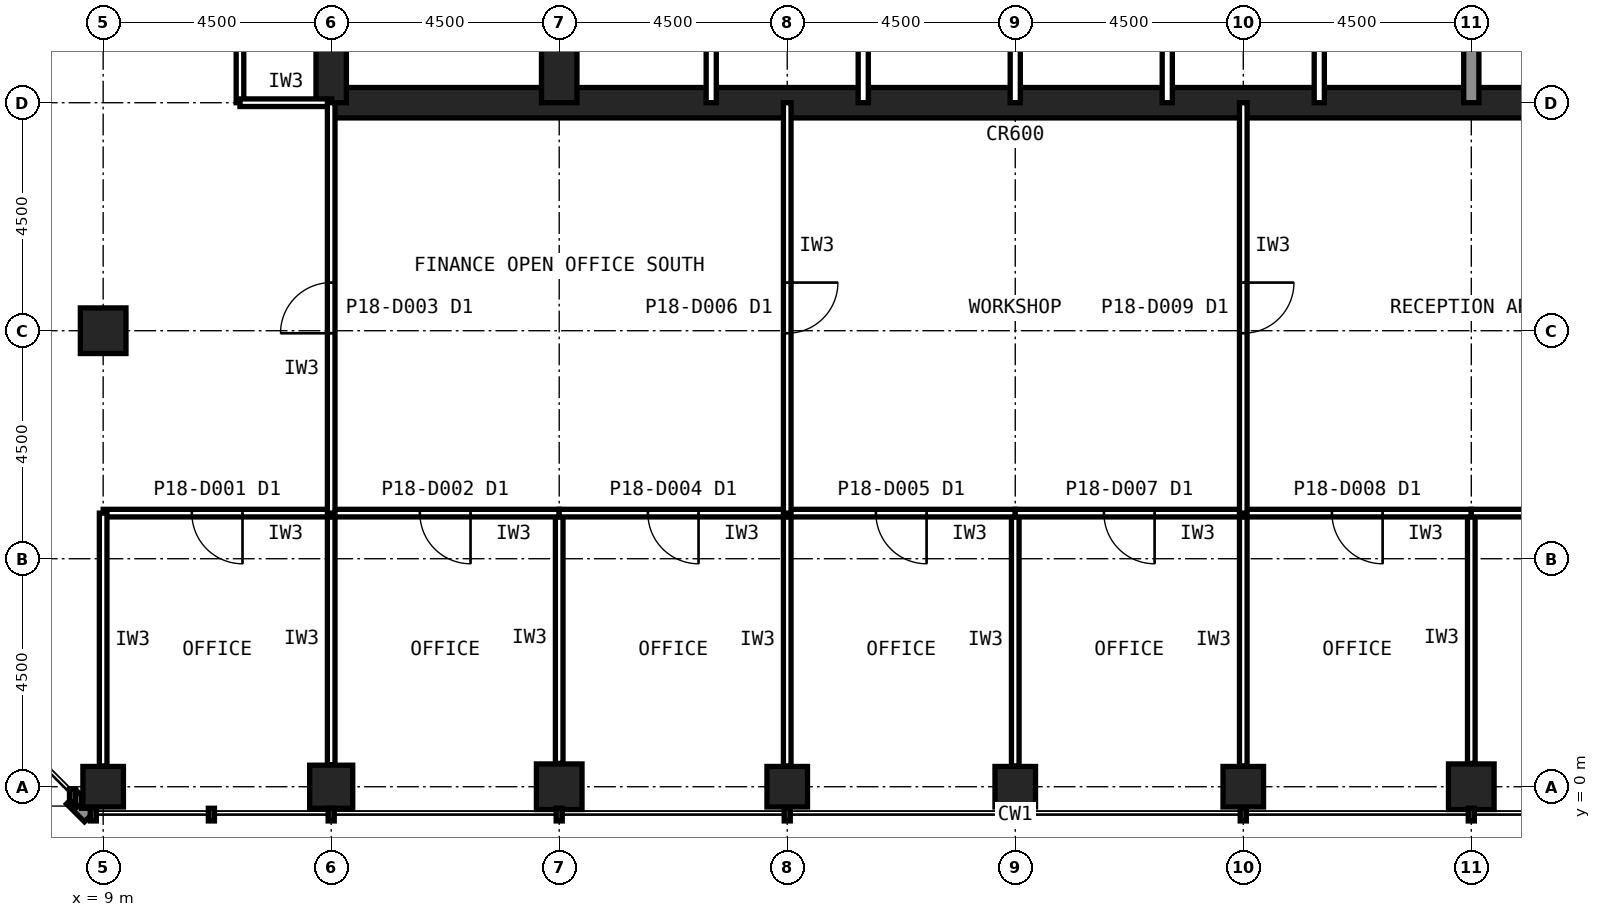
"""IFC4 building model, lengths in metres.
Left out: names, types, materials, properties, quantities, classifications, styles, units other than length and angle.
Written with IfcOpenShell. Run it as: python <this file> out.ifc"""

import sys

from ifc_helpers import new_model, si_unit, direction, frame, frame_2d, origin, origin_2d, place, context, subcontext, project, spatial, rectangle, hollow_rectangle, extrude, element, fill, save


model = new_model("IFC4")
c1 = context("Model", 3, precision=1e-05, world=origin(), true_north=direction((0.0, 1.0)))
c2 = subcontext(c1, "Body", "Model", "MODEL_VIEW")
j1 = project(units=[si_unit("LENGTHUNIT", "METRE"), si_unit("PLANEANGLEUNIT", "RADIAN")], contexts=[c1])
p1 = place(None, origin())
s1 = spatial("IfcSite", under=j1, at=p1, CompositionType="ELEMENT")
p2 = place(p1, origin())
s2 = spatial("IfcBuilding", under=s1, at=p2, CompositionType="ELEMENT")
p3 = place(p2, frame((0.0, 0.0, 79.4)))
s3 = spatial("IfcBuildingStorey", under=s2, at=p3, CompositionType="ELEMENT", Elevation=79.4)
p4 = place(p3, frame((9.0, 0.0, 0.0), z_axis=(0.0, 0.0, 1.0), x_axis=(1.0, 0.0, 0.0)))
e1 = element("IfcColumn", 1, at=p4, inside=s3, PredefinedType="COLUMN", context=c2, shape_type="SweptSolid", body=[
    extrude(hollow_rectangle(XDim=0.8, YDim=0.8, WallThickness=0.045, at=origin_2d()), origin(), (0.0, 0.0, 1.0), 4.2),
])
p5 = place(p3, frame((13.5, 0.0, 0.0), z_axis=(0.0, 0.0, 1.0), x_axis=(1.0, 0.0, 0.0)))
e2 = element("IfcColumn", 2, at=p5, inside=s3, PredefinedType="COLUMN", context=c2, shape_type="SweptSolid", body=[
    extrude(hollow_rectangle(XDim=0.85, YDim=0.85, WallThickness=0.05, at=origin_2d()), origin(), (0.0, 0.0, 1.0), 4.2),
])
p6 = place(p3, frame((18.0, 0.0, 0.0), z_axis=(0.0, 0.0, 1.0), x_axis=(1.0, 0.0, 0.0)))
e3 = element("IfcColumn", 3, at=p6, inside=s3, PredefinedType="COLUMN", context=c2, shape_type="SweptSolid", body=[
    extrude(hollow_rectangle(XDim=0.9, YDim=0.9, WallThickness=0.063, at=origin_2d()), origin(), (0.0, 0.0, 1.0), 4.2),
])
for number, where, z_axis, x_axis in (
    (4, (22.5, 0.0, 0.0), (0.0, 0.0, 1.0), (1.0, 0.0, 0.0)),
    (5, (27.0, 0.0, 0.0), (0.0, 0.0, 1.0), (1.0, 0.0, 0.0)),
    (6, (31.5, 0.0, 0.0), (0.0, 0.0, 1.0), (1.0, 0.0, 0.0)),
):
    element("IfcColumn", number, at=place(p3, frame(where, z_axis=z_axis, x_axis=x_axis)), inside=s3, PredefinedType="COLUMN", context=c2, shape_type="SweptSolid", body=[
        extrude(hollow_rectangle(XDim=0.8, YDim=0.8, WallThickness=0.045, at=origin_2d()), origin(), (0.0, 0.0, 1.0), 4.2),
    ])
for number, where, z_axis, x_axis in (
    (7, (36.0, 0.0, 0.0), (0.0, 0.0, 1.0), (1.0, 0.0, 0.0)),
    (8, (9.0, 9.0, 0.0), (0.0, 0.0, 1.0), (1.0, 0.0, 0.0)),
):
    element("IfcColumn", number, at=place(p3, frame(where, z_axis=z_axis, x_axis=x_axis)), inside=s3, PredefinedType="COLUMN", context=c2, shape_type="SweptSolid", body=[
        extrude(hollow_rectangle(XDim=0.9, YDim=0.9, WallThickness=0.063, at=origin_2d()), origin(), (0.0, 0.0, 1.0), 4.2),
    ])
p7 = place(p3, frame((13.5, 13.5, 0.0), z_axis=(0.0, 0.0, 1.0), x_axis=(1.0, 0.0, 0.0)))
e9 = element("IfcWall", 9, at=p7, inside=s3, PredefinedType="SHEAR", context=c2, shape_type="SweptSolid", body=[
    extrude(rectangle(XDim=27.0, YDim=0.6, at=frame_2d((13.5, 0.0))), origin(), (0.0, 0.0, 1.0), 4.2),
])
p8 = place(p3, frame((13.5, 40.5, 0.0), z_axis=(0.0, 0.0, 1.0), x_axis=(0.0, -1.0, 0.0)))
e10 = element("IfcWall", 10, at=p8, inside=s3, PredefinedType="SHEAR", context=c2, shape_type="SweptSolid", body=[
    extrude(rectangle(XDim=27.0, YDim=0.6, at=frame_2d((13.5, 0.0))), origin(), (0.0, 0.0, 1.0), 4.2),
])
p9 = place(p8, frame((19.65, 0.0, 0.0)))
e11 = element("IfcOpeningElement", 11, at=p9, cuts=e10, PredefinedType="OPENING", context=c2, shape_type="SweptSolid", body=[
    extrude(rectangle(XDim=1.2, YDim=2.1, at=frame_2d((0.6, 1.05))), frame((0.0, 0.31, 0.0), z_axis=(0.0, -1.0, 0.0), x_axis=(1.0, 0.0, 0.0)), (0.0, 0.0, 1.0), 0.62),
])
p10 = place(p8, frame((5.85, 0.0, 0.0)))
e12 = element("IfcOpeningElement", 12, at=p10, cuts=e10, PredefinedType="OPENING", context=c2, shape_type="SweptSolid", body=[
    extrude(rectangle(XDim=1.8, YDim=2.1, at=frame_2d((0.9, 1.05))), frame((0.0, 0.31, 0.0), z_axis=(0.0, -1.0, 0.0), x_axis=(1.0, 0.0, 0.0)), (0.0, 0.0, 1.0), 0.62),
])
p11 = place(p3, frame((18.0, 13.5, 0.0), z_axis=(0.0, 0.0, 1.0), x_axis=(0.0, 1.0, 0.0)))
e13 = element("IfcWall", 13, at=p11, inside=s3, PredefinedType="SHEAR", context=c2, shape_type="SweptSolid", body=[
    extrude(rectangle(XDim=18.0, YDim=0.7, at=frame_2d((9.0, 0.0))), origin(), (0.0, 0.0, 1.0), 4.2),
])
p12 = place(p3, frame((36.0, 13.5, 0.0), z_axis=(0.0, 0.0, 1.0), x_axis=(0.0, 1.0, 0.0)))
e14 = element("IfcWall", 14, at=p12, inside=s3, PredefinedType="SOLIDWALL", context=c2, shape_type="SweptSolid", body=[
    extrude(rectangle(XDim=4.5, YDim=0.3, at=frame_2d((2.25, 0.0))), origin(), (0.0, 0.0, 1.0), 4.04),
])
for number, where, z_axis, x_axis in (
    (15, (21.0, 13.5, 0.0), (0.0, 0.0, 1.0), (0.0, 1.0, 0.0)),
    (16, (24.0, 13.5, 0.0), (0.0, 0.0, 1.0), (0.0, 1.0, 0.0)),
    (17, (27.0, 13.5, 0.0), (0.0, 0.0, 1.0), (0.0, 1.0, 0.0)),
    (18, (30.0, 13.5, 0.0), (0.0, 0.0, 1.0), (0.0, 1.0, 0.0)),
    (19, (33.0, 13.5, 0.0), (0.0, 0.0, 1.0), (0.0, 1.0, 0.0)),
):
    element("IfcWall", number, at=place(p3, frame(where, z_axis=z_axis, x_axis=x_axis)), inside=s3, PredefinedType="PARTITIONING", context=c2, shape_type="SweptSolid", body=[
        extrude(rectangle(XDim=4.5, YDim=0.2, at=frame_2d((2.25, 0.0))), origin(), (0.0, 0.0, 1.0), 4.04),
    ])
p13 = place(p3, frame((11.7, 20.7, 0.0), z_axis=(0.0, 0.0, 1.0), x_axis=(0.0, -1.0, 0.0)))
e20 = element("IfcWall", 20, at=p13, inside=s3, PredefinedType="PARTITIONING", context=c2, shape_type="SweptSolid", body=[
    extrude(rectangle(XDim=7.2, YDim=0.15, at=frame_2d((3.6, 0.0))), origin(), (0.0, 0.0, 1.0), 4.04),
])
p14 = place(p3, frame((11.7, 13.5, 0.0), z_axis=(0.0, 0.0, 1.0), x_axis=(1.0, 0.0, 0.0)))
e21 = element("IfcWall", 21, at=p14, inside=s3, PredefinedType="PARTITIONING", context=c2, shape_type="SweptSolid", body=[
    extrude(rectangle(XDim=1.81, YDim=0.15, at=frame_2d((0.905, 0.0))), origin(), (0.0, 0.0, 1.0), 3.189),
])
p15 = place(p3, frame((13.5, 0.435, 0.0), z_axis=(0.0, 0.0, 1.0), x_axis=(0.0, 1.0, 0.0)))
e22 = element("IfcWall", 22, at=p15, inside=s3, PredefinedType="PARTITIONING", context=c2, shape_type="SweptSolid", body=[
    extrude(rectangle(XDim=4.965, YDim=0.15, at=frame_2d((2.482, 0.0))), origin(), (0.0, 0.0, 1.0), 3.189),
])
p16 = place(p3, frame((13.5, 5.4, 0.0), z_axis=(0.0, 0.0, 1.0), x_axis=(-1.0, 0.0, 0.0)))
e23 = element("IfcWall", 23, at=p16, inside=s3, PredefinedType="PARTITIONING", context=c2, shape_type="SweptSolid", body=[
    extrude(rectangle(XDim=4.5, YDim=0.15, at=frame_2d((2.25, 0.0))), origin(), (0.0, 0.0, 1.0), 4.04),
])
p17 = place(p16, frame((1.75, 0.0, 0.0)))
e24 = element("IfcOpeningElement", 24, at=p17, cuts=e23, PredefinedType="OPENING", context=c2, shape_type="SweptSolid", body=[
    extrude(rectangle(XDim=1.0, YDim=2.1, at=frame_2d((0.5, 1.05))), frame((0.0, 0.085, 0.0), z_axis=(0.0, -1.0, 0.0), x_axis=(1.0, 0.0, 0.0)), (0.0, 0.0, 1.0), 0.17),
])
p18 = place(p3, frame((9.0, 5.4, 0.0), z_axis=(0.0, 0.0, 1.0), x_axis=(0.0, -1.0, 0.0)))
e25 = element("IfcWall", 25, at=p18, inside=s3, PredefinedType="PARTITIONING", context=c2, shape_type="SweptSolid", body=[
    extrude(rectangle(XDim=4.99, YDim=0.15, at=frame_2d((2.495, 0.0))), origin(), (0.0, 0.0, 1.0), 3.429),
])
p19 = place(p3, frame((18.0, 0.46, 0.0), z_axis=(0.0, 0.0, 1.0), x_axis=(0.0, 1.0, 0.0)))
e26 = element("IfcWall", 26, at=p19, inside=s3, PredefinedType="PARTITIONING", context=c2, shape_type="SweptSolid", body=[
    extrude(rectangle(XDim=4.94, YDim=0.15, at=frame_2d((2.47, 0.0))), origin(), (0.0, 0.0, 1.0), 3.189),
])
p20 = place(p3, frame((18.0, 5.4, 0.0), z_axis=(0.0, 0.0, 1.0), x_axis=(-1.0, 0.0, 0.0)))
e27 = element("IfcWall", 27, at=p20, inside=s3, PredefinedType="PARTITIONING", context=c2, shape_type="SweptSolid", body=[
    extrude(rectangle(XDim=4.5, YDim=0.15, at=frame_2d((2.25, 0.0))), origin(), (0.0, 0.0, 1.0), 4.04),
])
p21 = place(p20, frame((1.75, 0.0, 0.0)))
e28 = element("IfcOpeningElement", 28, at=p21, cuts=e27, PredefinedType="OPENING", context=c2, shape_type="SweptSolid", body=[
    extrude(rectangle(XDim=1.0, YDim=2.1, at=frame_2d((0.5, 1.05))), frame((0.0, 0.085, 0.0), z_axis=(0.0, -1.0, 0.0), x_axis=(1.0, 0.0, 0.0)), (0.0, 0.0, 1.0), 0.17),
])
p22 = place(p3, frame((22.5, 0.41, 0.0), z_axis=(0.0, 0.0, 1.0), x_axis=(0.0, 1.0, 0.0)))
e29 = element("IfcWall", 29, at=p22, inside=s3, PredefinedType="PARTITIONING", context=c2, shape_type="SweptSolid", body=[
    extrude(rectangle(XDim=4.99, YDim=0.15, at=frame_2d((2.495, 0.0))), origin(), (0.0, 0.0, 1.0), 3.189),
])
p23 = place(p3, frame((22.5, 5.4, 0.0), z_axis=(0.0, 0.0, 1.0), x_axis=(-1.0, 0.0, 0.0)))
e30 = element("IfcWall", 30, at=p23, inside=s3, PredefinedType="PARTITIONING", context=c2, shape_type="SweptSolid", body=[
    extrude(rectangle(XDim=4.5, YDim=0.15, at=frame_2d((2.25, 0.0))), origin(), (0.0, 0.0, 1.0), 4.04),
])
p24 = place(p23, frame((1.75, 0.0, 0.0)))
e31 = element("IfcOpeningElement", 31, at=p24, cuts=e30, PredefinedType="OPENING", context=c2, shape_type="SweptSolid", body=[
    extrude(rectangle(XDim=1.0, YDim=2.1, at=frame_2d((0.5, 1.05))), frame((0.0, 0.085, 0.0), z_axis=(0.0, -1.0, 0.0), x_axis=(1.0, 0.0, 0.0)), (0.0, 0.0, 1.0), 0.17),
])
p25 = place(p3, frame((27.0, 0.41, 0.0), z_axis=(0.0, 0.0, 1.0), x_axis=(0.0, 1.0, 0.0)))
e32 = element("IfcWall", 32, at=p25, inside=s3, PredefinedType="PARTITIONING", context=c2, shape_type="SweptSolid", body=[
    extrude(rectangle(XDim=4.99, YDim=0.15, at=frame_2d((2.495, 0.0))), origin(), (0.0, 0.0, 1.0), 3.189),
])
p26 = place(p3, frame((27.0, 5.4, 0.0), z_axis=(0.0, 0.0, 1.0), x_axis=(-1.0, 0.0, 0.0)))
e33 = element("IfcWall", 33, at=p26, inside=s3, PredefinedType="PARTITIONING", context=c2, shape_type="SweptSolid", body=[
    extrude(rectangle(XDim=4.5, YDim=0.15, at=frame_2d((2.25, 0.0))), origin(), (0.0, 0.0, 1.0), 4.04),
])
p27 = place(p26, frame((1.75, 0.0, 0.0)))
e34 = element("IfcOpeningElement", 34, at=p27, cuts=e33, PredefinedType="OPENING", context=c2, shape_type="SweptSolid", body=[
    extrude(rectangle(XDim=1.0, YDim=2.1, at=frame_2d((0.5, 1.05))), frame((0.0, 0.085, 0.0), z_axis=(0.0, -1.0, 0.0), x_axis=(1.0, 0.0, 0.0)), (0.0, 0.0, 1.0), 0.17),
])
p28 = place(p3, frame((31.5, 0.41, 0.0), z_axis=(0.0, 0.0, 1.0), x_axis=(0.0, 1.0, 0.0)))
e35 = element("IfcWall", 35, at=p28, inside=s3, PredefinedType="PARTITIONING", context=c2, shape_type="SweptSolid", body=[
    extrude(rectangle(XDim=4.99, YDim=0.15, at=frame_2d((2.495, 0.0))), origin(), (0.0, 0.0, 1.0), 3.189),
])
p29 = place(p3, frame((31.5, 5.4, 0.0), z_axis=(0.0, 0.0, 1.0), x_axis=(-1.0, 0.0, 0.0)))
e36 = element("IfcWall", 36, at=p29, inside=s3, PredefinedType="PARTITIONING", context=c2, shape_type="SweptSolid", body=[
    extrude(rectangle(XDim=4.5, YDim=0.15, at=frame_2d((2.25, 0.0))), origin(), (0.0, 0.0, 1.0), 4.04),
])
p30 = place(p29, frame((1.75, 0.0, 0.0)))
e37 = element("IfcOpeningElement", 37, at=p30, cuts=e36, PredefinedType="OPENING", context=c2, shape_type="SweptSolid", body=[
    extrude(rectangle(XDim=1.0, YDim=2.1, at=frame_2d((0.5, 1.05))), frame((0.0, 0.085, 0.0), z_axis=(0.0, -1.0, 0.0), x_axis=(1.0, 0.0, 0.0)), (0.0, 0.0, 1.0), 0.17),
])
p31 = place(p3, frame((36.0, 0.46, 0.0), z_axis=(0.0, 0.0, 1.0), x_axis=(0.0, 1.0, 0.0)))
e38 = element("IfcWall", 38, at=p31, inside=s3, PredefinedType="PARTITIONING", context=c2, shape_type="SweptSolid", body=[
    extrude(rectangle(XDim=4.94, YDim=0.15, at=frame_2d((2.47, 0.0))), origin(), (0.0, 0.0, 1.0), 3.189),
])
p32 = place(p3, frame((36.0, 5.4, 0.0), z_axis=(0.0, 0.0, 1.0), x_axis=(-1.0, 0.0, 0.0)))
e39 = element("IfcWall", 39, at=p32, inside=s3, PredefinedType="PARTITIONING", context=c2, shape_type="SweptSolid", body=[
    extrude(rectangle(XDim=4.5, YDim=0.15, at=frame_2d((2.25, 0.0))), origin(), (0.0, 0.0, 1.0), 4.04),
])
p33 = place(p32, frame((1.75, 0.0, 0.0)))
e40 = element("IfcOpeningElement", 40, at=p33, cuts=e39, PredefinedType="OPENING", context=c2, shape_type="SweptSolid", body=[
    extrude(rectangle(XDim=1.0, YDim=2.1, at=frame_2d((0.5, 1.05))), frame((0.0, 0.085, 0.0), z_axis=(0.0, -1.0, 0.0), x_axis=(1.0, 0.0, 0.0)), (0.0, 0.0, 1.0), 0.17),
])
p34 = place(p3, frame((40.5, 5.4, 0.0), z_axis=(0.0, 0.0, 1.0), x_axis=(-1.0, 0.0, 0.0)))
e41 = element("IfcWall", 41, at=p34, inside=s3, PredefinedType="PARTITIONING", context=c2, shape_type="SweptSolid", body=[
    extrude(rectangle(XDim=4.5, YDim=0.15, at=frame_2d((2.25, 0.0))), origin(), (0.0, 0.0, 1.0), 4.04),
])
p35 = place(p34, frame((1.75, 0.0, 0.0)))
e42 = element("IfcOpeningElement", 42, at=p35, cuts=e41, PredefinedType="OPENING", context=c2, shape_type="SweptSolid", body=[
    extrude(rectangle(XDim=1.0, YDim=2.1, at=frame_2d((0.5, 1.05))), frame((0.0, 0.085, 0.0), z_axis=(0.0, -1.0, 0.0), x_axis=(1.0, 0.0, 0.0)), (0.0, 0.0, 1.0), 0.17),
])
p36 = place(p3, frame((13.5, 5.4, 0.0), z_axis=(0.0, 0.0, 1.0), x_axis=(0.0, 1.0, 0.0)))
e43 = element("IfcWall", 43, at=p36, inside=s3, PredefinedType="PARTITIONING", context=c2, shape_type="SweptSolid", body=[
    extrude(rectangle(XDim=8.1, YDim=0.15, at=frame_2d((4.05, 0.0))), origin(), (0.0, 0.0, 1.0), 3.189),
])
p37 = place(p36, frame((3.55, 0.0, 0.0)))
e44 = element("IfcOpeningElement", 44, at=p37, cuts=e43, PredefinedType="OPENING", context=c2, shape_type="SweptSolid", body=[
    extrude(rectangle(XDim=1.0, YDim=2.1, at=frame_2d((0.5, 1.05))), frame((0.0, 0.085, 0.0), z_axis=(0.0, -1.0, 0.0), x_axis=(1.0, 0.0, 0.0)), (0.0, 0.0, 1.0), 0.17),
])
p38 = place(p3, frame((22.5, 13.5, 0.0), z_axis=(0.0, 0.0, 1.0), x_axis=(0.0, -1.0, 0.0)))
e45 = element("IfcWall", 45, at=p38, inside=s3, PredefinedType="PARTITIONING", context=c2, shape_type="SweptSolid", body=[
    extrude(rectangle(XDim=8.1, YDim=0.15, at=frame_2d((4.05, 0.0))), origin(), (0.0, 0.0, 1.0), 3.189),
])
p39 = place(p38, frame((3.55, 0.0, 0.0)))
e46 = element("IfcOpeningElement", 46, at=p39, cuts=e45, PredefinedType="OPENING", context=c2, shape_type="SweptSolid", body=[
    extrude(rectangle(XDim=1.0, YDim=2.1, at=frame_2d((0.5, 1.05))), frame((0.0, 0.085, 0.0), z_axis=(0.0, -1.0, 0.0), x_axis=(1.0, 0.0, 0.0)), (0.0, 0.0, 1.0), 0.17),
])
p40 = place(p3, frame((31.5, 13.5, 0.0), z_axis=(0.0, 0.0, 1.0), x_axis=(0.0, -1.0, 0.0)))
e47 = element("IfcWall", 47, at=p40, inside=s3, PredefinedType="PARTITIONING", context=c2, shape_type="SweptSolid", body=[
    extrude(rectangle(XDim=8.1, YDim=0.15, at=frame_2d((4.05, 0.0))), origin(), (0.0, 0.0, 1.0), 3.189),
])
p41 = place(p40, frame((3.55, 0.0, 0.0)))
e48 = element("IfcOpeningElement", 48, at=p41, cuts=e47, PredefinedType="OPENING", context=c2, shape_type="SweptSolid", body=[
    extrude(rectangle(XDim=1.0, YDim=2.1, at=frame_2d((0.5, 1.05))), frame((0.0, 0.085, 0.0), z_axis=(0.0, -1.0, 0.0), x_axis=(1.0, 0.0, 0.0)), (0.0, 0.0, 1.0), 0.17),
])
p42 = place(p17, origin())
e49 = element("IfcDoor", 49, at=p42, inside=s3, OperationType="SINGLE_SWING_LEFT", PredefinedType="DOOR", context=c2, shape_type="SweptSolid", body=[
    extrude(rectangle(XDim=1.0, YDim=2.1, at=frame_2d((0.5, 1.05))), frame((0.0, 0.025, 0.0), z_axis=(0.0, -1.0, 0.0), x_axis=(1.0, 0.0, 0.0)), (0.0, 0.0, 1.0), 0.05),
])
fill(e24, e49)
p43 = place(p21, origin())
e50 = element("IfcDoor", 50, at=p43, inside=s3, OperationType="SINGLE_SWING_LEFT", PredefinedType="DOOR", context=c2, shape_type="SweptSolid", body=[
    extrude(rectangle(XDim=1.0, YDim=2.1, at=frame_2d((0.5, 1.05))), frame((0.0, 0.025, 0.0), z_axis=(0.0, -1.0, 0.0), x_axis=(1.0, 0.0, 0.0)), (0.0, 0.0, 1.0), 0.05),
])
fill(e28, e50)
p44 = place(p24, origin())
e51 = element("IfcDoor", 51, at=p44, inside=s3, OperationType="SINGLE_SWING_LEFT", PredefinedType="DOOR", context=c2, shape_type="SweptSolid", body=[
    extrude(rectangle(XDim=1.0, YDim=2.1, at=frame_2d((0.5, 1.05))), frame((0.0, 0.025, 0.0), z_axis=(0.0, -1.0, 0.0), x_axis=(1.0, 0.0, 0.0)), (0.0, 0.0, 1.0), 0.05),
])
fill(e31, e51)
p45 = place(p27, origin())
e52 = element("IfcDoor", 52, at=p45, inside=s3, OperationType="SINGLE_SWING_LEFT", PredefinedType="DOOR", context=c2, shape_type="SweptSolid", body=[
    extrude(rectangle(XDim=1.0, YDim=2.1, at=frame_2d((0.5, 1.05))), frame((0.0, 0.025, 0.0), z_axis=(0.0, -1.0, 0.0), x_axis=(1.0, 0.0, 0.0)), (0.0, 0.0, 1.0), 0.05),
])
fill(e34, e52)
p46 = place(p30, origin())
e53 = element("IfcDoor", 53, at=p46, inside=s3, OperationType="SINGLE_SWING_LEFT", PredefinedType="DOOR", context=c2, shape_type="SweptSolid", body=[
    extrude(rectangle(XDim=1.0, YDim=2.1, at=frame_2d((0.5, 1.05))), frame((0.0, 0.025, 0.0), z_axis=(0.0, -1.0, 0.0), x_axis=(1.0, 0.0, 0.0)), (0.0, 0.0, 1.0), 0.05),
])
fill(e37, e53)
p47 = place(p33, origin())
e54 = element("IfcDoor", 54, at=p47, inside=s3, OperationType="SINGLE_SWING_LEFT", PredefinedType="DOOR", context=c2, shape_type="SweptSolid", body=[
    extrude(rectangle(XDim=1.0, YDim=2.1, at=frame_2d((0.5, 1.05))), frame((0.0, 0.025, 0.0), z_axis=(0.0, -1.0, 0.0), x_axis=(1.0, 0.0, 0.0)), (0.0, 0.0, 1.0), 0.05),
])
fill(e40, e54)
p48 = place(p37, origin())
e55 = element("IfcDoor", 55, at=p48, inside=s3, OperationType="SINGLE_SWING_LEFT", PredefinedType="DOOR", context=c2, shape_type="SweptSolid", body=[
    extrude(rectangle(XDim=1.0, YDim=2.1, at=frame_2d((0.5, 1.05))), frame((0.0, 0.025, 0.0), z_axis=(0.0, -1.0, 0.0), x_axis=(1.0, 0.0, 0.0)), (0.0, 0.0, 1.0), 0.05),
])
fill(e44, e55)
p49 = place(p39, origin())
e56 = element("IfcDoor", 56, at=p49, inside=s3, OperationType="SINGLE_SWING_LEFT", PredefinedType="DOOR", context=c2, shape_type="SweptSolid", body=[
    extrude(rectangle(XDim=1.0, YDim=2.1, at=frame_2d((0.5, 1.05))), frame((0.0, 0.025, 0.0), z_axis=(0.0, -1.0, 0.0), x_axis=(1.0, 0.0, 0.0)), (0.0, 0.0, 1.0), 0.05),
])
fill(e46, e56)
p50 = place(p41, origin())
e57 = element("IfcDoor", 57, at=p50, inside=s3, OperationType="SINGLE_SWING_LEFT", PredefinedType="DOOR", context=c2, shape_type="SweptSolid", body=[
    extrude(rectangle(XDim=1.0, YDim=2.1, at=frame_2d((0.5, 1.05))), frame((0.0, 0.025, 0.0), z_axis=(0.0, -1.0, 0.0), x_axis=(1.0, 0.0, 0.0)), (0.0, 0.0, 1.0), 0.05),
])
fill(e48, e57)
save(model, sys.argv[1])
